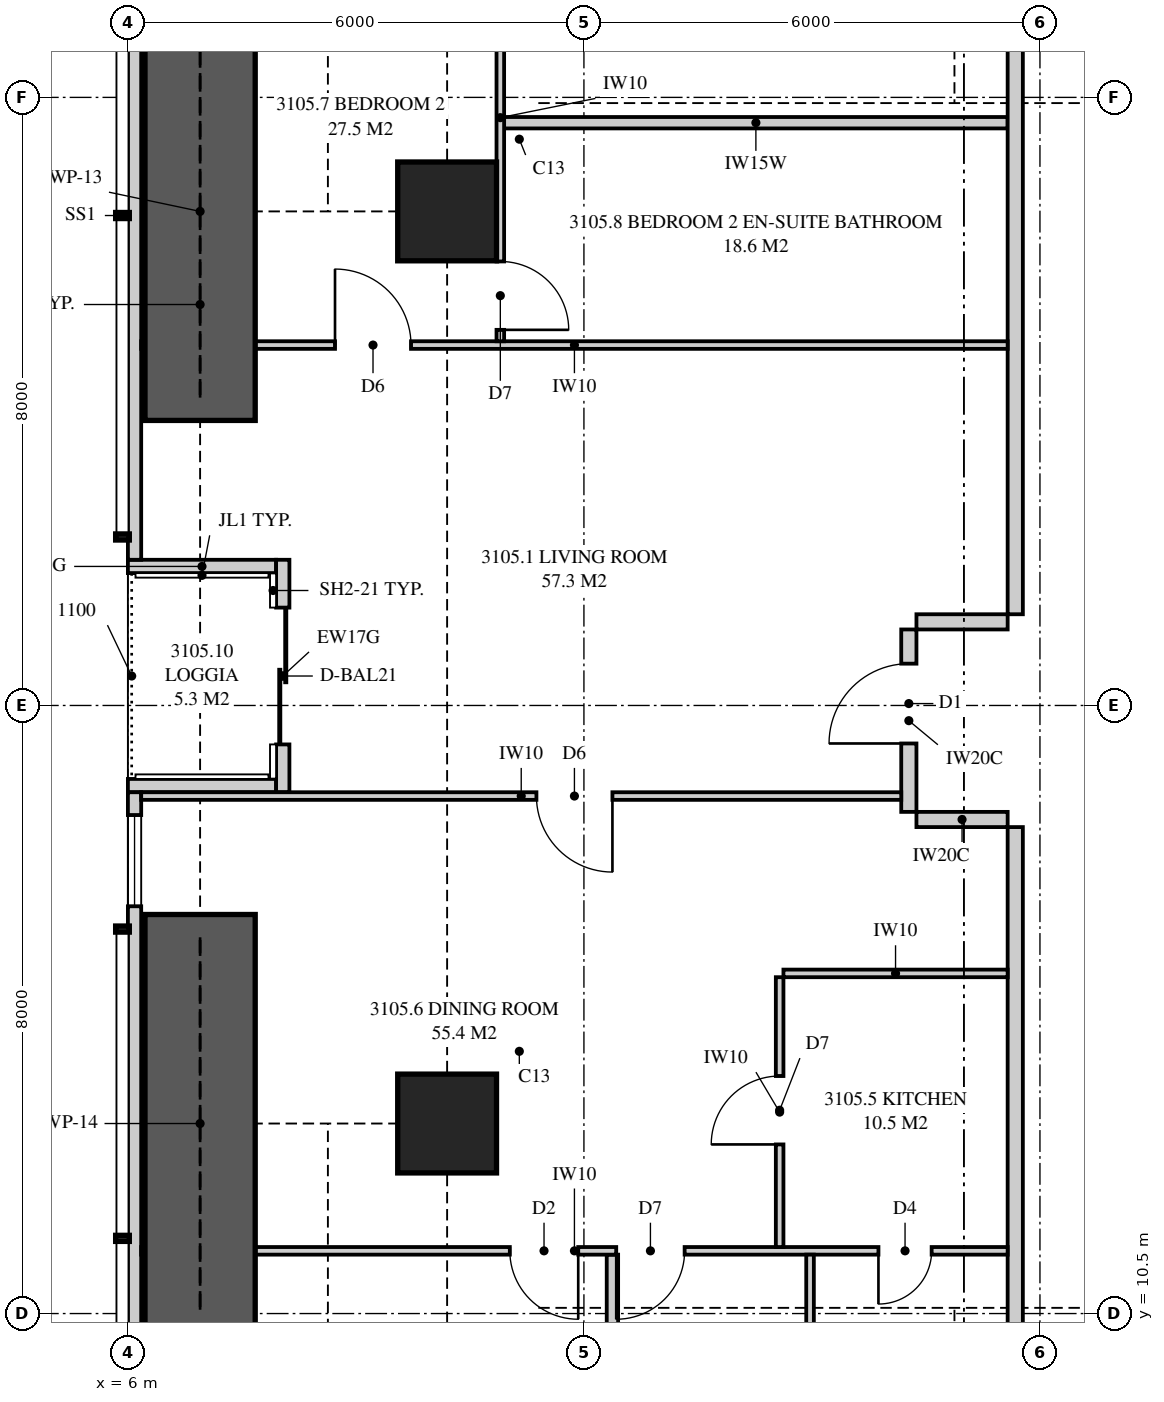
"""IFC4 building model, lengths in metres.
Left out: names, types, materials, properties, quantities, classifications, styles, units other than length and angle.
Written with IfcOpenShell. Run it as: python <this file> out.ifc"""

import sys

from ifc_helpers import new_model, si_unit, direction, frame, frame_2d, origin, origin_2d, place, context, subcontext, project, spatial, polyline, rectangle, outline, extrude, element, fill, save


model = new_model("IFC4")
c1 = context("Model", 3, precision=1e-05, world=origin(), true_north=direction((0.0, 1.0)))
c2 = subcontext(c1, "Body", "Model", "MODEL_VIEW")
j1 = project(units=[si_unit("LENGTHUNIT", "METRE"), si_unit("PLANEANGLEUNIT", "RADIAN")], contexts=[c1])
p1 = place(None, origin())
s1 = spatial("IfcSite", under=j1, at=p1, CompositionType="ELEMENT")
p2 = place(p1, origin())
s2 = spatial("IfcBuilding", under=s1, at=p2, CompositionType="ELEMENT")
p3 = place(p2, frame((0.0, 0.0, 114.9)))
s3 = spatial("IfcBuildingStorey", under=s2, at=p3, CompositionType="ELEMENT", Elevation=114.9)
for number, where, z_axis, x_axis in (
    (1, (10.2, 13.0, 0.0), (0.0, 0.0, 1.0), (1.0, 0.0, 0.0)),
    (2, (10.2, 25.0, 0.0), (0.0, 0.0, 1.0), (1.0, 0.0, 0.0)),
):
    element("IfcColumn", number, at=place(p3, frame(where, z_axis=z_axis, x_axis=x_axis)), inside=s3, PredefinedType="COLUMN", context=c2, shape_type="SweptSolid", body=[
        extrude(rectangle(XDim=1.3, YDim=1.3, at=origin_2d()), origin(), (0.0, 0.0, 1.0), 3.35),
    ])
p4 = place(p3, frame((6.087, 34.949, 0.0), z_axis=(0.0, 0.0, 1.0), x_axis=(0.0, -1.0, 0.0)))
e3 = element("IfcWall", 3, at=p4, inside=s3, PredefinedType="SOLIDWALL", context=c2, shape_type="SweptSolid", body=[
    extrude(outline(polyline([(0.0, 0.0), (14.532, 0.0), (14.532, 2.15), (9.949, 2.15), (9.949, 3.11), (9.823, 3.11), (9.823, 2.15), (9.73, 2.15), (9.73, 3.11), (0.0, 3.11), (0.0, 0.0)])), frame((0.0, 0.087, 0.0), z_axis=(0.0, -1.0, 0.0), x_axis=(1.0, 0.0, 0.0)), (0.0, 0.0, 1.0), 0.175),
])
p5 = place(p4, frame((0.636, 0.0, 0.4)))
e4 = element("IfcOpeningElement", 4, at=p5, cuts=e3, PredefinedType="OPENING", context=c2, shape_type="SweptSolid", body=[
    extrude(rectangle(XDim=2.4, YDim=1.7, at=frame_2d((1.2, 0.85))), frame((0.0, 0.097, 0.0), z_axis=(0.0, -1.0, 0.0), x_axis=(1.0, 0.0, 0.0)), (0.0, 0.0, 1.0), 0.195),
])
p6 = place(p4, frame((5.874, 0.0, 0.4)))
e5 = element("IfcOpeningElement", 5, at=p6, cuts=e3, PredefinedType="OPENING", context=c2, shape_type="SweptSolid", body=[
    extrude(rectangle(XDim=1.2, YDim=1.7, at=frame_2d((0.6, 0.85))), frame((0.0, 0.097, 0.0), z_axis=(0.0, -1.0, 0.0), x_axis=(1.0, 0.0, 0.0)), (0.0, 0.0, 1.0), 0.195),
])
p7 = place(p3, frame((6.087, 17.358, 0.0), z_axis=(0.0, 0.0, 1.0), x_axis=(0.0, -1.0, 0.0)))
e6 = element("IfcWall", 6, at=p7, inside=s3, PredefinedType="SOLIDWALL", context=c2, shape_type="SweptSolid", body=[
    extrude(outline(polyline([(0.0, 0.0), (14.307, 0.0), (14.307, 3.11), (4.577, 3.11), (4.577, 2.15), (4.484, 2.15), (4.484, 3.11), (4.358, 3.11), (4.358, 2.15), (0.0, 2.15), (0.0, 0.0)])), frame((0.0, 0.087, 0.0), z_axis=(0.0, -1.0, 0.0), x_axis=(1.0, 0.0, 0.0)), (0.0, 0.0, 1.0), 0.175),
])
p8 = place(p7, frame((0.3, 0.0, 0.4)))
e7 = element("IfcOpeningElement", 7, at=p8, cuts=e6, PredefinedType="OPENING", context=c2, shape_type="SweptSolid", body=[
    extrude(rectangle(XDim=1.2, YDim=1.7, at=frame_2d((0.6, 0.85))), frame((0.0, 0.097, 0.0), z_axis=(0.0, -1.0, 0.0), x_axis=(1.0, 0.0, 0.0)), (0.0, 0.0, 1.0), 0.195),
])
p9 = place(p7, frame((7.233, 0.0, 0.4)))
e8 = element("IfcOpeningElement", 8, at=p9, cuts=e6, PredefinedType="OPENING", context=c2, shape_type="SweptSolid", body=[
    extrude(rectangle(XDim=1.8, YDim=1.7, at=frame_2d((0.9, 0.85))), frame((0.0, 0.097, 0.0), z_axis=(0.0, -1.0, 0.0), x_axis=(1.0, 0.0, 0.0)), (0.0, 0.0, 1.0), 0.195),
])
p10 = place(p3, frame((8.038, 20.417, 0.0), z_axis=(0.0, 0.0, 1.0), x_axis=(0.0, -1.0, 0.0)))
e9 = element("IfcWall", 9, at=p10, inside=s3, PredefinedType="SOLIDWALL", context=c2, shape_type="SweptSolid", body=[
    extrude(rectangle(XDim=3.058, YDim=0.175, at=frame_2d((1.529, 0.0))), origin(), (0.0, 0.0, 1.0), 3.11),
])
p11 = place(p10, frame((0.629, 0.0, 0.0)))
e10 = element("IfcOpeningElement", 10, at=p11, cuts=e9, PredefinedType="OPENING", context=c2, shape_type="SweptSolid", body=[
    extrude(rectangle(XDim=1.8, YDim=2.1, at=frame_2d((0.9, 1.05))), frame((0.0, 0.097, 0.0), z_axis=(0.0, -1.0, 0.0), x_axis=(1.0, 0.0, 0.0)), (0.0, 0.0, 1.0), 0.195),
])
for number, where, z_axis, x_axis in (
    (11, (6.0, 20.329, 0.0), (0.0, 0.0, 1.0), (1.0, 0.0, 0.0)),
    (12, (6.0, 17.446, 0.0), (0.0, 0.0, 1.0), (1.0, 0.0, 0.0)),
):
    element("IfcWall", number, at=place(p3, frame(where, z_axis=z_axis, x_axis=x_axis)), inside=s3, PredefinedType="SOLIDWALL", context=c2, shape_type="SweptSolid", body=[
        extrude(outline(polyline([(0.0, 0.0), (1.95, 0.0), (1.95, 3.11), (1.75, 3.11), (1.75, 2.15), (0.15, 2.15), (0.15, 3.11), (0.0, 3.11), (0.0, 0.0)])), frame((0.0, 0.087, 0.0), z_axis=(0.0, -1.0, 0.0), x_axis=(1.0, 0.0, 0.0)), (0.0, 0.0, 1.0), 0.175),
    ])
p12 = place(p3, frame((17.675, 7.825, 0.0), z_axis=(0.0, 0.0, 1.0), x_axis=(0.0, 1.0, 0.0)))
e13 = element("IfcWall", 13, at=p12, inside=s3, PredefinedType="PARTITIONING", context=c2, shape_type="SweptSolid", body=[
    extrude(outline(polyline([(0.0, 0.0), (9.075, 0.0), (9.075, 3.11), (3.087, 3.11), (3.087, 2.541), (2.413, 2.541), (2.413, 3.11), (0.0, 3.11), (0.0, 0.0)])), frame((0.0, 0.1, 0.0), z_axis=(0.0, -1.0, 0.0), x_axis=(1.0, 0.0, 0.0)), (0.0, 0.0, 1.0), 0.2),
])
p13 = place(p3, frame((6.175, 11.325, 0.0), z_axis=(0.0, 0.0, 1.0), x_axis=(1.0, 0.0, 0.0)))
e14 = element("IfcWall", 14, at=p13, inside=s3, PredefinedType="PARTITIONING", context=c2, shape_type="SweptSolid", body=[
    extrude(outline(polyline([(0.175, 3.11), (0.0, 3.11), (0.0, 0.0), (0.529, 0.0), (0.529, 0.325), (1.021, 0.325), (1.021, 0.0), (11.4, 0.0), (11.4, 3.11), (5.285, 3.11), (5.285, 2.51), (2.765, 2.51), (2.765, 3.11), (2.744, 3.11), (2.744, 2.541), (2.169, 2.541), (2.169, 3.11), (1.918, 3.11), (1.918, 2.15), (1.021, 2.15), (1.021, 1.825), (0.529, 1.825), (0.529, 2.15), (0.175, 2.15), (0.175, 3.11)])), frame((0.0, 0.05, 0.0), z_axis=(0.0, -1.0, 0.0), x_axis=(1.0, 0.0, 0.0)), (0.0, 0.0, 1.0), 0.1),
])
p14 = place(p13, frame((4.85, 0.0, 0.0)))
e15 = element("IfcOpeningElement", 15, at=p14, cuts=e14, PredefinedType="OPENING", context=c2, shape_type="SweptSolid", body=[
    extrude(rectangle(XDim=0.9, YDim=2.1, at=frame_2d((0.45, 1.05))), frame((0.0, 0.06, 0.0), z_axis=(0.0, -1.0, 0.0), x_axis=(1.0, 0.0, 0.0)), (0.0, 0.0, 1.0), 0.12),
])
p15 = place(p13, frame((6.25, 0.0, 0.0)))
e16 = element("IfcOpeningElement", 16, at=p15, cuts=e14, PredefinedType="OPENING", context=c2, shape_type="SweptSolid", body=[
    extrude(rectangle(XDim=0.9, YDim=2.1, at=frame_2d((0.45, 1.05))), frame((0.0, 0.06, 0.0), z_axis=(0.0, -1.0, 0.0), x_axis=(1.0, 0.0, 0.0)), (0.0, 0.0, 1.0), 0.12),
])
p16 = place(p13, frame((9.7, 0.0, 0.0)))
e17 = element("IfcOpeningElement", 17, at=p16, cuts=e14, PredefinedType="OPENING", context=c2, shape_type="SweptSolid", body=[
    extrude(rectangle(XDim=0.7, YDim=2.1, at=frame_2d((0.35, 1.05))), frame((0.0, 0.06, 0.0), z_axis=(0.0, -1.0, 0.0), x_axis=(1.0, 0.0, 0.0)), (0.0, 0.0, 1.0), 0.12),
])
p17 = place(p3, frame((12.375, 7.825, 0.0), z_axis=(0.0, 0.0, 1.0), x_axis=(0.0, 1.0, 0.0)))
e18 = element("IfcWall", 18, at=p17, inside=s3, PredefinedType="PLUMBINGWALL", context=c2, shape_type="SweptSolid", body=[
    extrude(outline(polyline([(0.0, 0.0), (3.45, 0.0), (3.45, 3.11), (3.062, 3.11), (3.062, 2.541), (2.438, 2.541), (2.438, 3.11), (0.0, 3.11), (0.0, 0.0)])), frame((0.0, 0.075, 0.0), z_axis=(0.0, -1.0, 0.0), x_axis=(1.0, 0.0, 0.0)), (0.0, 0.0, 1.0), 0.15),
])
p18 = place(p3, frame((14.975, 7.825, 0.0), z_axis=(0.0, 0.0, 1.0), x_axis=(0.0, 1.0, 0.0)))
e19 = element("IfcWall", 19, at=p18, inside=s3, PredefinedType="PARTITIONING", context=c2, shape_type="SweptSolid", body=[
    extrude(outline(polyline([(0.0, 0.0), (3.45, 0.0), (3.45, 3.11), (3.037, 3.11), (3.037, 2.541), (2.463, 2.541), (2.463, 3.11), (0.0, 3.11), (0.0, 0.0)])), frame((0.0, 0.05, 0.0), z_axis=(0.0, -1.0, 0.0), x_axis=(1.0, 0.0, 0.0)), (0.0, 0.0, 1.0), 0.1),
])
p19 = place(p3, frame((14.575, 11.375, 0.0), z_axis=(0.0, 0.0, 1.0), x_axis=(0.0, 1.0, 0.0)))
e20 = element("IfcWall", 20, at=p19, inside=s3, PredefinedType="PARTITIONING", context=c2, shape_type="SweptSolid", body=[
    extrude(rectangle(XDim=3.55, YDim=0.1, at=frame_2d((1.775, 0.0))), origin(), (0.0, 0.0, 1.0), 3.11),
])
p20 = place(p19, frame((1.35, 0.0, 0.0)))
e21 = element("IfcOpeningElement", 21, at=p20, cuts=e20, PredefinedType="OPENING", context=c2, shape_type="SweptSolid", body=[
    extrude(rectangle(XDim=0.9, YDim=2.1, at=frame_2d((0.45, 1.05))), frame((0.0, 0.06, 0.0), z_axis=(0.0, -1.0, 0.0), x_axis=(1.0, 0.0, 0.0)), (0.0, 0.0, 1.0), 0.12),
])
p21 = place(p3, frame((14.625, 14.975, 0.0), z_axis=(0.0, 0.0, 1.0), x_axis=(1.0, 0.0, 0.0)))
e22 = element("IfcWall", 22, at=p21, inside=s3, PredefinedType="PARTITIONING", context=c2, shape_type="SweptSolid", body=[
    extrude(rectangle(XDim=2.95, YDim=0.1, at=frame_2d((1.475, 0.0))), origin(), (0.0, 0.0, 1.0), 3.11),
])
p22 = place(p3, frame((6.175, 17.308, 0.0), z_axis=(0.0, 0.0, 1.0), x_axis=(1.0, 0.0, 0.0)))
e23 = element("IfcWall", 23, at=p22, inside=s3, PredefinedType="PARTITIONING", context=c2, shape_type="SweptSolid", body=[
    extrude(outline(polyline([(0.0, 0.0), (10.0, 0.0), (10.0, 3.11), (5.285, 3.11), (5.285, 2.51), (2.765, 2.51), (2.765, 3.11), (1.635, 3.11), (1.635, 2.15), (0.0, 2.15), (0.0, 3.11), (0.0, 0.0)])), frame((0.0, 0.05, 0.0), z_axis=(0.0, -1.0, 0.0), x_axis=(1.0, 0.0, 0.0)), (0.0, 0.0, 1.0), 0.1),
])
p23 = place(p22, frame((5.2, 0.0, 0.0)))
e24 = element("IfcOpeningElement", 24, at=p23, cuts=e23, PredefinedType="OPENING", context=c2, shape_type="SweptSolid", body=[
    extrude(rectangle(XDim=1.0, YDim=2.1, at=frame_2d((0.5, 1.05))), frame((0.0, 0.06, 0.0), z_axis=(0.0, -1.0, 0.0), x_axis=(1.0, 0.0, 0.0)), (0.0, 0.0, 1.0), 0.12),
])
p24 = place(p3, frame((6.175, 23.242, 0.0), z_axis=(0.0, 0.0, 1.0), x_axis=(1.0, 0.0, 0.0)))
e25 = element("IfcWall", 25, at=p24, inside=s3, PredefinedType="PARTITIONING", context=c2, shape_type="SweptSolid", body=[
    extrude(outline(polyline([(0.529, 2.15), (0.0, 2.15), (0.0, 0.0), (0.529, 0.0), (0.529, 0.268), (1.021, 0.268), (1.021, 0.0), (11.4, 0.0), (11.4, 3.11), (5.285, 3.11), (5.285, 2.51), (2.765, 2.51), (2.765, 3.11), (1.635, 3.11), (1.635, 2.15), (1.021, 2.15), (1.021, 1.882), (0.529, 1.882), (0.529, 2.15)])), frame((0.0, 0.05, 0.0), z_axis=(0.0, -1.0, 0.0), x_axis=(1.0, 0.0, 0.0)), (0.0, 0.0, 1.0), 0.1),
])
p25 = place(p24, frame((2.55, 0.0, 0.0)))
e26 = element("IfcOpeningElement", 26, at=p25, cuts=e25, PredefinedType="OPENING", context=c2, shape_type="SweptSolid", body=[
    extrude(rectangle(XDim=1.0, YDim=2.1, at=frame_2d((0.5, 1.05))), frame((0.0, 0.06, 0.0), z_axis=(0.0, -1.0, 0.0), x_axis=(1.0, 0.0, 0.0)), (0.0, 0.0, 1.0), 0.12),
])
p26 = place(p3, frame((17.675, 19.7, 0.0), z_axis=(0.0, 0.0, 1.0), x_axis=(0.0, 1.0, 0.0)))
e27 = element("IfcWall", 27, at=p26, inside=s3, PredefinedType="PARTITIONING", context=c2, shape_type="SweptSolid", body=[
    extrude(outline(polyline([(0.0, 0.0), (9.475, 0.0), (9.475, 3.11), (7.062, 3.11), (7.062, 2.541), (6.388, 2.541), (6.388, 3.11), (0.0, 3.11), (0.0, 0.0)])), frame((0.0, 0.1, 0.0), z_axis=(0.0, -1.0, 0.0), x_axis=(1.0, 0.0, 0.0)), (0.0, 0.0, 1.0), 0.2),
])
p27 = place(p3, frame((16.275, 17.1, 0.0), z_axis=(0.0, 0.0, 1.0), x_axis=(0.0, 1.0, 0.0)))
e28 = element("IfcWall", 28, at=p27, inside=s3, PredefinedType="PARTITIONING", context=c2, shape_type="SweptSolid", body=[
    extrude(rectangle(XDim=2.4, YDim=0.2, at=frame_2d((1.2, 0.0))), origin(), (0.0, 0.0, 1.0), 3.11),
])
p28 = place(p27, frame((0.9, 0.0, 0.0)))
e29 = element("IfcOpeningElement", 29, at=p28, cuts=e28, PredefinedType="OPENING", context=c2, shape_type="SweptSolid", body=[
    extrude(rectangle(XDim=1.05, YDim=2.2, at=frame_2d((0.525, 1.1))), frame((0.0, 0.11, 0.0), z_axis=(0.0, -1.0, 0.0), x_axis=(1.0, 0.0, 0.0)), (0.0, 0.0, 1.0), 0.22),
])
for number, where, z_axis, x_axis in (
    (30, (17.575, 17.0, 0.0), (0.0, 0.0, 1.0), (-1.0, 0.0, 0.0)),
    (31, (17.575, 19.6, 0.0), (0.0, 0.0, 1.0), (-1.0, 0.0, 0.0)),
):
    element("IfcWall", number, at=place(p3, frame(where, z_axis=z_axis, x_axis=x_axis)), inside=s3, PredefinedType="PARTITIONING", context=c2, shape_type="SweptSolid", body=[
        extrude(rectangle(XDim=1.2, YDim=0.2, at=frame_2d((0.6, 0.0))), origin(), (0.0, 0.0, 1.0), 3.11),
    ])
p29 = place(p3, frame((10.9, 23.292, 0.0), z_axis=(0.0, 0.0, 1.0), x_axis=(0.0, 1.0, 0.0)))
e32 = element("IfcWall", 32, at=p29, inside=s3, PredefinedType="PARTITIONING", context=c2, shape_type="SweptSolid", body=[
    extrude(outline(polyline([(0.0, 0.0), (5.883, 0.0), (5.883, 3.11), (5.883, 2.51), (1.768, 2.51), (0.0, 2.51), (0.0, 3.11), (0.0, 0.0)])), frame((0.0, 0.05, 0.0), z_axis=(0.0, -1.0, 0.0), x_axis=(1.0, 0.0, 0.0)), (0.0, 0.0, 1.0), 0.1),
])
p30 = place(p29, frame((0.15, 0.0, 0.0)))
e33 = element("IfcOpeningElement", 33, at=p30, cuts=e32, PredefinedType="OPENING", context=c2, shape_type="SweptSolid", body=[
    extrude(rectangle(XDim=0.9, YDim=2.1, at=frame_2d((0.45, 1.05))), frame((0.0, 0.06, 0.0), z_axis=(0.0, -1.0, 0.0), x_axis=(1.0, 0.0, 0.0)), (0.0, 0.0, 1.0), 0.12),
])
p31 = place(p29, frame((4.017, 0.0, 0.0)))
e34 = element("IfcOpeningElement", 34, at=p31, cuts=e32, PredefinedType="OPENING", context=c2, shape_type="SweptSolid", body=[
    extrude(rectangle(XDim=0.9, YDim=2.1, at=frame_2d((0.45, 1.05))), frame((0.0, 0.06, 0.0), z_axis=(0.0, -1.0, 0.0), x_axis=(1.0, 0.0, 0.0)), (0.0, 0.0, 1.0), 0.12),
])
p32 = place(p3, frame((10.95, 26.167, 0.0), z_axis=(0.0, 0.0, 1.0), x_axis=(1.0, 0.0, 0.0)))
e35 = element("IfcWall", 35, at=p32, inside=s3, PredefinedType="PLUMBINGWALL", context=c2, shape_type="SweptSolid", body=[
    extrude(outline(polyline([(0.0, 0.0), (6.625, 0.0), (6.625, 3.11), (6.625, 2.541), (0.535, 2.541), (0.535, 2.51), (0.0, 2.51), (0.0, 3.11), (0.0, 0.0)])), frame((0.0, 0.075, 0.0), z_axis=(0.0, -1.0, 0.0), x_axis=(1.0, 0.0, 0.0)), (0.0, 0.0, 1.0), 0.15),
])
for number, where, z_axis, x_axis in (
    (36, (6.95, 22.25, 0.0), (0.0, 0.0, 1.0), (0.0, 1.0, 0.0)),
    (37, (6.95, 10.25, 0.0), (0.0, 0.0, 1.0), (0.0, 1.0, 0.0)),
):
    element("IfcWall", number, at=place(p3, frame(where, z_axis=z_axis, x_axis=x_axis)), inside=s3, PredefinedType="SHEAR", context=c2, shape_type="SweptSolid", body=[
        extrude(rectangle(XDim=5.5, YDim=1.45, at=frame_2d((2.75, 0.0))), origin(), (0.0, 0.0, 1.0), 3.35),
    ])
p33 = place(p11, origin())
e38 = element("IfcDoor", 38, at=p33, inside=s3, OperationType="SLIDING_TO_LEFT", PredefinedType="DOOR", context=c2, shape_type="SweptSolid", body=[
    extrude(rectangle(XDim=1.8, YDim=2.1, at=frame_2d((0.9, 1.05))), frame((0.0, 0.025, 0.0), z_axis=(0.0, -1.0, 0.0), x_axis=(1.0, 0.0, 0.0)), (0.0, 0.0, 1.0), 0.05),
])
fill(e10, e38)
p34 = place(p8, origin())
e39 = element("IfcWindow", 39, at=p34, inside=s3, PartitioningType="SINGLE_PANEL", PredefinedType="WINDOW", context=c2, shape_type="SweptSolid", body=[
    extrude(rectangle(XDim=1.2, YDim=1.7, at=frame_2d((0.6, 0.85))), frame((0.0, 0.03, 0.0), z_axis=(0.0, -1.0, 0.0), x_axis=(1.0, 0.0, 0.0)), (0.0, 0.0, 1.0), 0.06),
])
fill(e7, e39)
p35 = place(p28, origin())
e40 = element("IfcDoor", 40, at=p35, inside=s3, OperationType="SINGLE_SWING_LEFT", PredefinedType="DOOR", context=c2, shape_type="SweptSolid", body=[
    extrude(rectangle(XDim=1.05, YDim=2.2, at=frame_2d((0.525, 1.1))), frame((0.0, 0.025, 0.0), z_axis=(0.0, -1.0, 0.0), x_axis=(1.0, 0.0, 0.0)), (0.0, 0.0, 1.0), 0.05),
])
fill(e29, e40)
p36 = place(p14, frame((0.9, 0.0, 0.0), z_axis=(0.0, 0.0, 1.0), x_axis=(-1.0, 0.0, 0.0)))
e41 = element("IfcDoor", 41, at=p36, inside=s3, OperationType="SINGLE_SWING_LEFT", PredefinedType="DOOR", context=c2, shape_type="SweptSolid", body=[
    extrude(rectangle(XDim=0.9, YDim=2.1, at=frame_2d((0.45, 1.05))), frame((0.0, 0.025, 0.0), z_axis=(0.0, -1.0, 0.0), x_axis=(1.0, 0.0, 0.0)), (0.0, 0.0, 1.0), 0.05),
])
fill(e15, e41)
p37 = place(p15, frame((0.9, 0.0, 0.0), z_axis=(0.0, 0.0, 1.0), x_axis=(-1.0, 0.0, 0.0)))
e42 = element("IfcDoor", 42, at=p37, inside=s3, OperationType="SINGLE_SWING_RIGHT", PredefinedType="DOOR", context=c2, shape_type="SweptSolid", body=[
    extrude(rectangle(XDim=0.9, YDim=2.1, at=frame_2d((0.45, 1.05))), frame((0.0, 0.025, 0.0), z_axis=(0.0, -1.0, 0.0), x_axis=(1.0, 0.0, 0.0)), (0.0, 0.0, 1.0), 0.05),
])
fill(e16, e42)
p38 = place(p16, frame((0.7, 0.0, 0.0), z_axis=(0.0, 0.0, 1.0), x_axis=(-1.0, 0.0, 0.0)))
e43 = element("IfcDoor", 43, at=p38, inside=s3, OperationType="SINGLE_SWING_RIGHT", PredefinedType="DOOR", context=c2, shape_type="SweptSolid", body=[
    extrude(rectangle(XDim=0.7, YDim=2.1, at=frame_2d((0.35, 1.05))), frame((0.0, 0.025, 0.0), z_axis=(0.0, -1.0, 0.0), x_axis=(1.0, 0.0, 0.0)), (0.0, 0.0, 1.0), 0.05),
])
fill(e17, e43)
p39 = place(p20, origin())
e44 = element("IfcDoor", 44, at=p39, inside=s3, OperationType="SINGLE_SWING_LEFT", PredefinedType="DOOR", context=c2, shape_type="SweptSolid", body=[
    extrude(rectangle(XDim=0.9, YDim=2.1, at=frame_2d((0.45, 1.05))), frame((0.0, 0.025, 0.0), z_axis=(0.0, -1.0, 0.0), x_axis=(1.0, 0.0, 0.0)), (0.0, 0.0, 1.0), 0.05),
])
fill(e21, e44)
p40 = place(p23, frame((1.0, 0.0, 0.0), z_axis=(0.0, 0.0, 1.0), x_axis=(-1.0, 0.0, 0.0)))
e45 = element("IfcDoor", 45, at=p40, inside=s3, OperationType="SINGLE_SWING_LEFT", PredefinedType="DOOR", context=c2, shape_type="SweptSolid", body=[
    extrude(rectangle(XDim=1.0, YDim=2.1, at=frame_2d((0.5, 1.05))), frame((0.0, 0.025, 0.0), z_axis=(0.0, -1.0, 0.0), x_axis=(1.0, 0.0, 0.0)), (0.0, 0.0, 1.0), 0.05),
])
fill(e24, e45)
p41 = place(p25, origin())
e46 = element("IfcDoor", 46, at=p41, inside=s3, OperationType="SINGLE_SWING_LEFT", PredefinedType="DOOR", context=c2, shape_type="SweptSolid", body=[
    extrude(rectangle(XDim=1.0, YDim=2.1, at=frame_2d((0.5, 1.05))), frame((0.0, 0.025, 0.0), z_axis=(0.0, -1.0, 0.0), x_axis=(1.0, 0.0, 0.0)), (0.0, 0.0, 1.0), 0.05),
])
fill(e26, e46)
p42 = place(p30, frame((0.9, 0.0, 0.0), z_axis=(0.0, 0.0, 1.0), x_axis=(-1.0, 0.0, 0.0)))
e47 = element("IfcDoor", 47, at=p42, inside=s3, OperationType="SINGLE_SWING_RIGHT", PredefinedType="DOOR", context=c2, shape_type="SweptSolid", body=[
    extrude(rectangle(XDim=0.9, YDim=2.1, at=frame_2d((0.45, 1.05))), frame((0.0, 0.025, 0.0), z_axis=(0.0, -1.0, 0.0), x_axis=(1.0, 0.0, 0.0)), (0.0, 0.0, 1.0), 0.05),
])
fill(e33, e47)
save(model, sys.argv[1])
